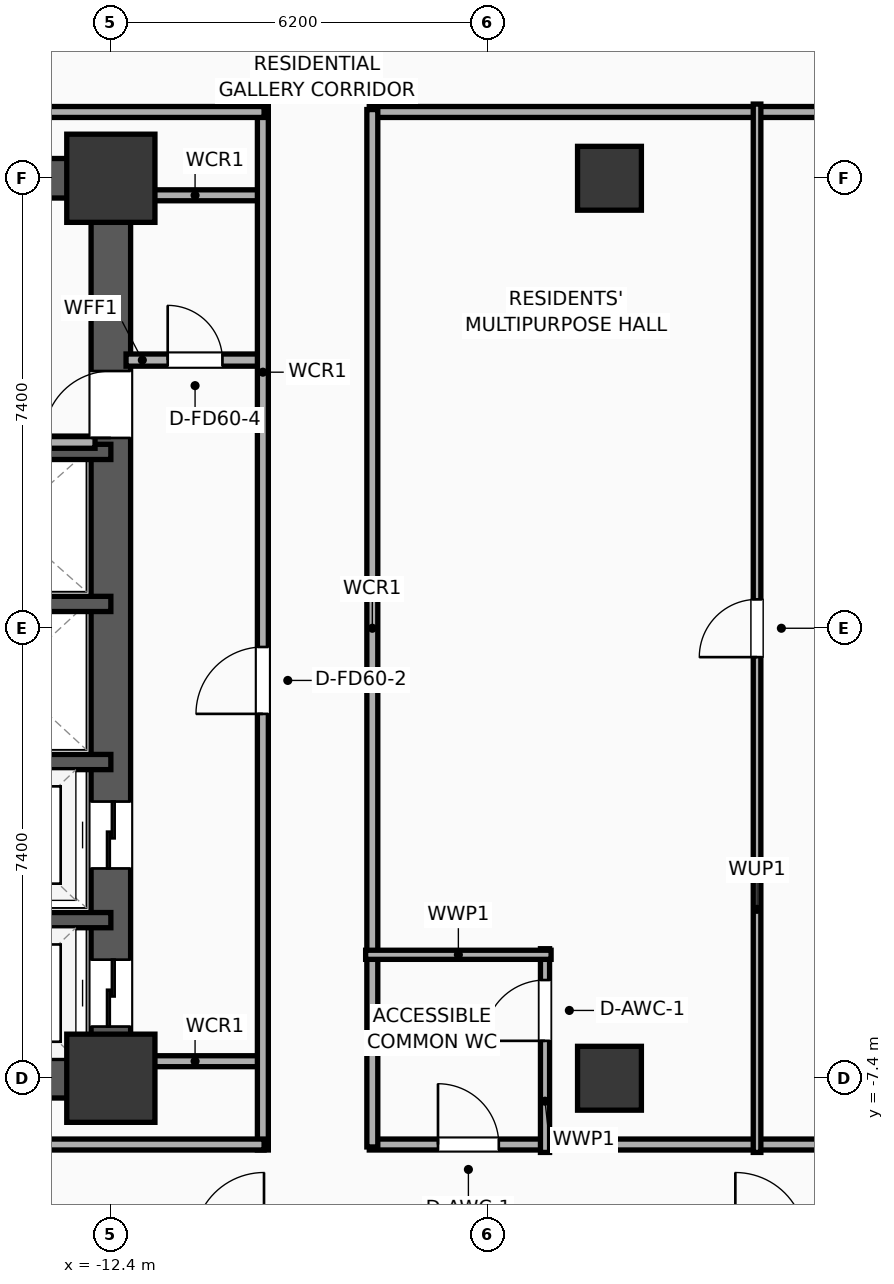
"""IFC4 building model, lengths in metres.
Left out: names, types, materials, properties, quantities, classifications, styles, units other than length and angle.
Written with IfcOpenShell. Run it as: python <this file> out.ifc"""

import sys

from ifc_helpers import new_model, si_unit, direction, frame, frame_2d, origin, origin_2d, place, context, subcontext, project, spatial, rectangle, extrude, element, fill, save


model = new_model("IFC4")
c1 = context("Model", 3, precision=1e-05, world=origin(), true_north=direction((0.0, 1.0)))
c2 = subcontext(c1, "Body", "Model", "MODEL_VIEW")
j1 = project(units=[si_unit("LENGTHUNIT", "METRE"), si_unit("PLANEANGLEUNIT", "RADIAN")], contexts=[c1])
p1 = place(None, origin())
s1 = spatial("IfcSite", under=j1, at=p1, CompositionType="ELEMENT")
p2 = place(p1, origin())
s2 = spatial("IfcBuilding", under=s1, at=p2, CompositionType="ELEMENT")
p3 = place(p2, frame((0.0, 0.0, 41.6)))
s3 = spatial("IfcBuildingStorey", under=s2, at=p3, CompositionType="ELEMENT", Elevation=41.6)
for number, where, z_axis, x_axis in (
    (1, (-12.4, -7.4, 0.0), (0.0, 0.0, 1.0), (1.0, 0.0, 0.0)),
    (2, (-12.4, 7.4, 0.0), (0.0, 0.0, 1.0), (1.0, 0.0, 0.0)),
):
    element("IfcColumn", number, at=place(p3, frame(where, z_axis=z_axis, x_axis=x_axis)), inside=s3, PredefinedType="COLUMN", context=c2, shape_type="SweptSolid", body=[
        extrude(rectangle(XDim=1.45, YDim=1.45, at=origin_2d()), origin(), (0.0, 0.0, 1.0), 3.9),
    ])
for number, where, z_axis, x_axis in (
    (3, (-19.525, -7.4, 0.0), (0.0, 0.0, 1.0), (1.0, 0.0, 0.0)),
    (4, (-19.525, 7.4, 0.0), (0.0, 0.0, 1.0), (1.0, 0.0, 0.0)),
):
    element("IfcWall", number, at=place(p3, frame(where, z_axis=z_axis, x_axis=x_axis)), inside=s3, PredefinedType="SHEAR", context=c2, shape_type="SweptSolid", body=[
        extrude(rectangle(XDim=7.45, YDim=0.65, at=frame_2d((3.725, 0.0))), origin(), (0.0, 0.0, 1.0), 3.65),
    ])
p4 = place(p3, frame((-12.4, -7.4, 0.0), z_axis=(0.0, 0.0, 1.0), x_axis=(0.0, 1.0, 0.0)))
e5 = element("IfcWall", 5, at=p4, inside=s3, PredefinedType="SHEAR", context=c2, shape_type="SweptSolid", body=[
    extrude(rectangle(XDim=14.8, YDim=0.65, at=frame_2d((7.4, 0.0))), origin(), (0.0, 0.0, 1.0), 3.65),
])
p5 = place(p4, frame((0.85, 0.0, 0.0)))
e6 = element("IfcOpeningElement", 6, at=p5, cuts=e5, PredefinedType="OPENING", context=c2, shape_type="SweptSolid", body=[
    extrude(rectangle(XDim=1.1, YDim=2.05, at=frame_2d((0.55, 1.025))), frame((0.0, 0.335, 0.0), z_axis=(0.0, -1.0, 0.0), x_axis=(1.0, 0.0, 0.0)), (0.0, 0.0, 1.0), 0.67),
])
p6 = place(p4, frame((3.45, 0.0, 0.0)))
e7 = element("IfcOpeningElement", 7, at=p6, cuts=e5, PredefinedType="OPENING", context=c2, shape_type="SweptSolid", body=[
    extrude(rectangle(XDim=1.1, YDim=2.05, at=frame_2d((0.55, 1.025))), frame((0.0, 0.335, 0.0), z_axis=(0.0, -1.0, 0.0), x_axis=(1.0, 0.0, 0.0)), (0.0, 0.0, 1.0), 0.67),
])
p7 = place(p4, frame((10.53, 0.0, 0.0)))
e8 = element("IfcOpeningElement", 8, at=p7, cuts=e5, PredefinedType="OPENING", context=c2, shape_type="SweptSolid", body=[
    extrude(rectangle(XDim=1.1, YDim=2.05, at=frame_2d((0.55, 1.025))), frame((0.0, 0.335, 0.0), z_axis=(0.0, -1.0, 0.0), x_axis=(1.0, 0.0, 0.0)), (0.0, 0.0, 1.0), 0.67),
])
for number, where, z_axis, x_axis in (
    (9, (-4.2, -7.4, 0.0), (0.0, 0.0, 1.0), (1.0, 0.0, 0.0)),
    (10, (-4.2, 7.4, 0.0), (0.0, 0.0, 1.0), (1.0, 0.0, 0.0)),
):
    element("IfcColumn", number, at=place(p3, frame(where, z_axis=z_axis, x_axis=x_axis)), inside=s3, PredefinedType="COLUMN", context=c2, shape_type="SweptSolid", body=[
        extrude(rectangle(XDim=1.05, YDim=1.05, at=origin_2d()), origin(), (0.0, 0.0, 1.0), 3.9),
    ])
for number, where, z_axis, x_axis in (
    (11, (-12.4, -4.8, 0.0), (0.0, 0.0, 1.0), (-1.0, 0.0, 0.0)),
    (12, (-12.4, -2.2, 0.0), (0.0, 0.0, 1.0), (-1.0, 0.0, 0.0)),
    (13, (-12.4, 0.4, 0.0), (0.0, 0.0, 1.0), (-1.0, 0.0, 0.0)),
    (14, (-12.4, 2.9, 0.0), (0.0, 0.0, 1.0), (-1.0, 0.0, 0.0)),
):
    element("IfcWall", number, at=place(p3, frame(where, z_axis=z_axis, x_axis=x_axis)), inside=s3, PredefinedType="SOLIDWALL", context=c2, shape_type="SweptSolid", body=[
        extrude(rectangle(XDim=3.0, YDim=0.25, at=frame_2d((1.5, 0.0))), origin(), (0.0, 0.0, 1.0), 3.65),
    ])
p8 = place(p3, frame((-15.82, 3.06, 0.0), z_axis=(0.0, 0.0, 1.0), x_axis=(1.0, 0.0, 0.0)))
e15 = element("IfcWall", 15, at=p8, inside=s3, PredefinedType="PARTITIONING", context=c2, shape_type="SweptSolid", body=[
    extrude(rectangle(XDim=3.16, YDim=0.2, at=frame_2d((1.58, 0.0))), origin(), (0.0, 0.0, 1.0), 3.65),
])
p9 = place(p3, frame((-12.15, 4.41, 0.0), z_axis=(0.0, 0.0, 1.0), x_axis=(1.0, 0.0, 0.0)))
e16 = element("IfcWall", 16, at=p9, inside=s3, PredefinedType="PARTITIONING", context=c2, shape_type="SweptSolid", body=[
    extrude(rectangle(XDim=2.27, YDim=0.2, at=frame_2d((1.135, 0.0))), origin(), (0.0, 0.0, 1.0), 3.65),
])
p10 = place(p9, frame((0.685, 0.0, 0.0)))
e17 = element("IfcOpeningElement", 17, at=p10, cuts=e16, PredefinedType="OPENING", context=c2, shape_type="SweptSolid", body=[
    extrude(rectangle(XDim=0.9, YDim=2.05, at=frame_2d((0.45, 1.025))), frame((0.0, 0.11, 0.0), z_axis=(0.0, -1.0, 0.0), x_axis=(1.0, 0.0, 0.0)), (0.0, 0.0, 1.0), 0.22),
])
for number, where, z_axis, x_axis in (
    (18, (-12.15, 7.12, 0.0), (0.0, 0.0, 1.0), (1.0, 0.0, 0.0)),
    (19, (-12.15, -7.12, 0.0), (0.0, 0.0, 1.0), (1.0, 0.0, 0.0)),
):
    element("IfcWall", number, at=place(p3, frame(where, z_axis=z_axis, x_axis=x_axis)), inside=s3, PredefinedType="PARTITIONING", context=c2, shape_type="SweptSolid", body=[
        extrude(rectangle(XDim=2.27, YDim=0.18, at=frame_2d((1.135, 0.0))), origin(), (0.0, 0.0, 1.0), 2.94),
    ])
p11 = place(p3, frame((-9.9, -8.58, 0.0), z_axis=(0.0, 0.0, 1.0), x_axis=(0.0, 1.0, 0.0)))
e20 = element("IfcWall", 20, at=p11, inside=s3, PredefinedType="PARTITIONING", context=c2, shape_type="SweptSolid", body=[
    extrude(rectangle(XDim=17.16, YDim=0.18, at=frame_2d((8.58, 0.0))), origin(), (0.0, 0.0, 1.0), 3.65),
])
p12 = place(p11, frame((7.172, 0.0, 0.0)))
e21 = element("IfcOpeningElement", 21, at=p12, cuts=e20, PredefinedType="OPENING", context=c2, shape_type="SweptSolid", body=[
    extrude(rectangle(XDim=1.1, YDim=2.05, at=frame_2d((0.55, 1.025))), frame((0.0, 0.1, 0.0), z_axis=(0.0, -1.0, 0.0), x_axis=(1.0, 0.0, 0.0)), (0.0, 0.0, 1.0), 0.2),
])
p13 = place(p3, frame((-33.41, 8.49, 0.0), z_axis=(0.0, 0.0, 1.0), x_axis=(1.0, 0.0, 0.0)))
e22 = element("IfcWall", 22, at=p13, inside=s3, PredefinedType="PARTITIONING", context=c2, shape_type="SweptSolid", body=[
    extrude(rectangle(XDim=23.53, YDim=0.18, at=frame_2d((11.765, 0.0))), origin(), (0.0, 0.0, 1.0), 3.65),
])
p14 = place(p13, frame((4.915, 0.0, 0.0)))
e23 = element("IfcOpeningElement", 23, at=p14, cuts=e22, PredefinedType="OPENING", context=c2, shape_type="SweptSolid", body=[
    extrude(rectangle(XDim=1.15, YDim=2.05, at=frame_2d((0.575, 1.025))), frame((0.0, 0.1, 0.0), z_axis=(0.0, -1.0, 0.0), x_axis=(1.0, 0.0, 0.0)), (0.0, 0.0, 1.0), 0.2),
])
p15 = place(p3, frame((-33.41, -8.49, 0.0), z_axis=(0.0, 0.0, 1.0), x_axis=(1.0, 0.0, 0.0)))
e24 = element("IfcWall", 24, at=p15, inside=s3, PredefinedType="PARTITIONING", context=c2, shape_type="SweptSolid", body=[
    extrude(rectangle(XDim=23.53, YDim=0.18, at=frame_2d((11.765, 0.0))), origin(), (0.0, 0.0, 1.0), 3.65),
])
p16 = place(p3, frame((-8.15, 8.49, 0.0), z_axis=(0.0, 0.0, 1.0), x_axis=(1.0, 0.0, 0.0)))
e25 = element("IfcWall", 25, at=p16, inside=s3, PredefinedType="PARTITIONING", context=c2, shape_type="SweptSolid", body=[
    extrude(rectangle(XDim=16.3, YDim=0.18, at=frame_2d((8.15, 0.0))), origin(), (0.0, 0.0, 1.0), 3.65),
])
p17 = place(p16, frame((8.49, 0.0, 0.0)))
e26 = element("IfcOpeningElement", 26, at=p17, cuts=e25, PredefinedType="OPENING", context=c2, shape_type="SweptSolid", body=[
    extrude(rectangle(XDim=0.95, YDim=2.05, at=frame_2d((0.475, 1.025))), frame((0.0, 0.1, 0.0), z_axis=(0.0, -1.0, 0.0), x_axis=(1.0, 0.0, 0.0)), (0.0, 0.0, 1.0), 0.2),
])
p18 = place(p3, frame((-8.15, -8.49, 0.0), z_axis=(0.0, 0.0, 1.0), x_axis=(1.0, 0.0, 0.0)))
e27 = element("IfcWall", 27, at=p18, inside=s3, PredefinedType="PARTITIONING", context=c2, shape_type="SweptSolid", body=[
    extrude(rectangle(XDim=16.3, YDim=0.18, at=frame_2d((8.15, 0.0))), origin(), (0.0, 0.0, 1.0), 3.65),
])
p19 = place(p18, frame((1.13, 0.0, 0.0)))
e28 = element("IfcOpeningElement", 28, at=p19, cuts=e27, PredefinedType="OPENING", context=c2, shape_type="SweptSolid", body=[
    extrude(rectangle(XDim=1.0, YDim=2.05, at=frame_2d((0.5, 1.025))), frame((0.0, 0.1, 0.0), z_axis=(0.0, -1.0, 0.0), x_axis=(1.0, 0.0, 0.0)), (0.0, 0.0, 1.0), 0.2),
])
p20 = place(p18, frame((10.12, 0.0, 0.0)))
e29 = element("IfcOpeningElement", 29, at=p20, cuts=e27, PredefinedType="OPENING", context=c2, shape_type="SweptSolid", body=[
    extrude(rectangle(XDim=0.95, YDim=2.05, at=frame_2d((0.475, 1.025))), frame((0.0, 0.1, 0.0), z_axis=(0.0, -1.0, 0.0), x_axis=(1.0, 0.0, 0.0)), (0.0, 0.0, 1.0), 0.2),
])
p21 = place(p3, frame((-8.1, -8.53, 0.0), z_axis=(0.0, 0.0, 1.0), x_axis=(0.0, 1.0, 0.0)))
e30 = element("IfcWall", 30, at=p21, inside=s3, PredefinedType="PARTITIONING", context=c2, shape_type="SweptSolid", body=[
    extrude(rectangle(XDim=17.06, YDim=0.18, at=frame_2d((8.53, 0.0))), origin(), (0.0, 0.0, 1.0), 3.65),
])
p22 = place(p3, frame((-5.26, -8.62, 0.0), z_axis=(0.0, 0.0, 1.0), x_axis=(0.0, 1.0, 0.0)))
e31 = element("IfcWall", 31, at=p22, inside=s3, PredefinedType="PLUMBINGWALL", context=c2, shape_type="SweptSolid", body=[
    extrude(rectangle(XDim=3.35, YDim=0.15, at=frame_2d((1.675, 0.0))), origin(), (0.0, 0.0, 1.0), 3.65),
])
p23 = place(p22, frame((1.835, 0.0, 0.0)))
e32 = element("IfcOpeningElement", 32, at=p23, cuts=e31, PredefinedType="OPENING", context=c2, shape_type="SweptSolid", body=[
    extrude(rectangle(XDim=1.0, YDim=2.05, at=frame_2d((0.5, 1.025))), frame((0.0, 0.085, 0.0), z_axis=(0.0, -1.0, 0.0), x_axis=(1.0, 0.0, 0.0)), (0.0, 0.0, 1.0), 0.17),
])
p24 = place(p3, frame((-8.21, -5.37, 0.0), z_axis=(0.0, 0.0, 1.0), x_axis=(1.0, 0.0, 0.0)))
e33 = element("IfcWall", 33, at=p24, inside=s3, PredefinedType="PLUMBINGWALL", context=c2, shape_type="SweptSolid", body=[
    extrude(rectangle(XDim=3.05, YDim=0.15, at=frame_2d((1.525, 0.0))), origin(), (0.0, 0.0, 1.0), 3.65),
])
p25 = place(p3, frame((-1.773, -8.62, 0.0), z_axis=(0.0, 0.0, 1.0), x_axis=(0.0, 1.0, 0.0)))
e34 = element("IfcWall", 34, at=p25, inside=s3, PredefinedType="PARTITIONING", context=c2, shape_type="SweptSolid", body=[
    extrude(rectangle(XDim=17.24, YDim=0.125, at=frame_2d((8.62, 0.0))), origin(), (0.0, 0.0, 1.0), 3.65),
])
p26 = place(p25, frame((8.145, 0.0, 0.0)))
e35 = element("IfcOpeningElement", 35, at=p26, cuts=e34, PredefinedType="OPENING", context=c2, shape_type="SweptSolid", body=[
    extrude(rectangle(XDim=0.95, YDim=2.05, at=frame_2d((0.475, 1.025))), frame((0.0, 0.073, 0.0), z_axis=(0.0, -1.0, 0.0), x_axis=(1.0, 0.0, 0.0)), (0.0, 0.0, 1.0), 0.145),
])
p27 = place(p5, origin())
e36 = element("IfcDoor", 36, at=p27, inside=s3, OperationType="SLIDING_TO_LEFT", PredefinedType="DOOR", context=c2, shape_type="SweptSolid", body=[
    extrude(rectangle(XDim=1.1, YDim=2.05, at=frame_2d((0.55, 1.025))), frame((0.0, 0.025, 0.0), z_axis=(0.0, -1.0, 0.0), x_axis=(1.0, 0.0, 0.0)), (0.0, 0.0, 1.0), 0.05),
])
fill(e6, e36)
p28 = place(p6, origin())
e37 = element("IfcDoor", 37, at=p28, inside=s3, OperationType="SLIDING_TO_LEFT", PredefinedType="DOOR", context=c2, shape_type="SweptSolid", body=[
    extrude(rectangle(XDim=1.1, YDim=2.05, at=frame_2d((0.55, 1.025))), frame((0.0, 0.025, 0.0), z_axis=(0.0, -1.0, 0.0), x_axis=(1.0, 0.0, 0.0)), (0.0, 0.0, 1.0), 0.05),
])
fill(e7, e37)
p29 = place(p10, origin())
e38 = element("IfcDoor", 38, at=p29, inside=s3, OperationType="SINGLE_SWING_LEFT", PredefinedType="DOOR", context=c2, shape_type="SweptSolid", body=[
    extrude(rectangle(XDim=0.9, YDim=2.05, at=frame_2d((0.45, 1.025))), frame((0.0, 0.025, 0.0), z_axis=(0.0, -1.0, 0.0), x_axis=(1.0, 0.0, 0.0)), (0.0, 0.0, 1.0), 0.05),
])
fill(e17, e38)
p30 = place(p12, origin())
e39 = element("IfcDoor", 39, at=p30, inside=s3, OperationType="SINGLE_SWING_LEFT", PredefinedType="DOOR", context=c2, shape_type="SweptSolid", body=[
    extrude(rectangle(XDim=1.1, YDim=2.05, at=frame_2d((0.55, 1.025))), frame((0.0, 0.025, 0.0), z_axis=(0.0, -1.0, 0.0), x_axis=(1.0, 0.0, 0.0)), (0.0, 0.0, 1.0), 0.05),
])
fill(e21, e39)
p31 = place(p19, origin())
e40 = element("IfcDoor", 40, at=p31, inside=s3, OperationType="SINGLE_SWING_LEFT", PredefinedType="DOOR", context=c2, shape_type="SweptSolid", body=[
    extrude(rectangle(XDim=1.0, YDim=2.05, at=frame_2d((0.5, 1.025))), frame((0.0, 0.025, 0.0), z_axis=(0.0, -1.0, 0.0), x_axis=(1.0, 0.0, 0.0)), (0.0, 0.0, 1.0), 0.05),
])
fill(e28, e40)
p32 = place(p23, origin())
e41 = element("IfcDoor", 41, at=p32, inside=s3, OperationType="SINGLE_SWING_LEFT", PredefinedType="DOOR", context=c2, shape_type="SweptSolid", body=[
    extrude(rectangle(XDim=1.0, YDim=2.05, at=frame_2d((0.5, 1.025))), frame((0.0, 0.025, 0.0), z_axis=(0.0, -1.0, 0.0), x_axis=(1.0, 0.0, 0.0)), (0.0, 0.0, 1.0), 0.05),
])
fill(e32, e41)
p33 = place(p26, origin())
e42 = element("IfcDoor", 42, at=p33, inside=s3, OperationType="SINGLE_SWING_LEFT", PredefinedType="DOOR", context=c2, shape_type="SweptSolid", body=[
    extrude(rectangle(XDim=0.95, YDim=2.05, at=frame_2d((0.475, 1.025))), frame((0.0, 0.025, 0.0), z_axis=(0.0, -1.0, 0.0), x_axis=(1.0, 0.0, 0.0)), (0.0, 0.0, 1.0), 0.05),
])
fill(e35, e42)
p34 = place(p7, origin())
e43 = element("IfcDoor", 43, at=p34, inside=s3, OperationType="SINGLE_SWING_LEFT", PredefinedType="DOOR", context=c2, shape_type="SweptSolid", body=[
    extrude(rectangle(XDim=1.1, YDim=2.05, at=frame_2d((0.55, 1.025))), frame((0.0, 0.025, 0.0), z_axis=(0.0, -1.0, 0.0), x_axis=(1.0, 0.0, 0.0)), (0.0, 0.0, 1.0), 0.05),
])
fill(e8, e43)
save(model, sys.argv[1])
